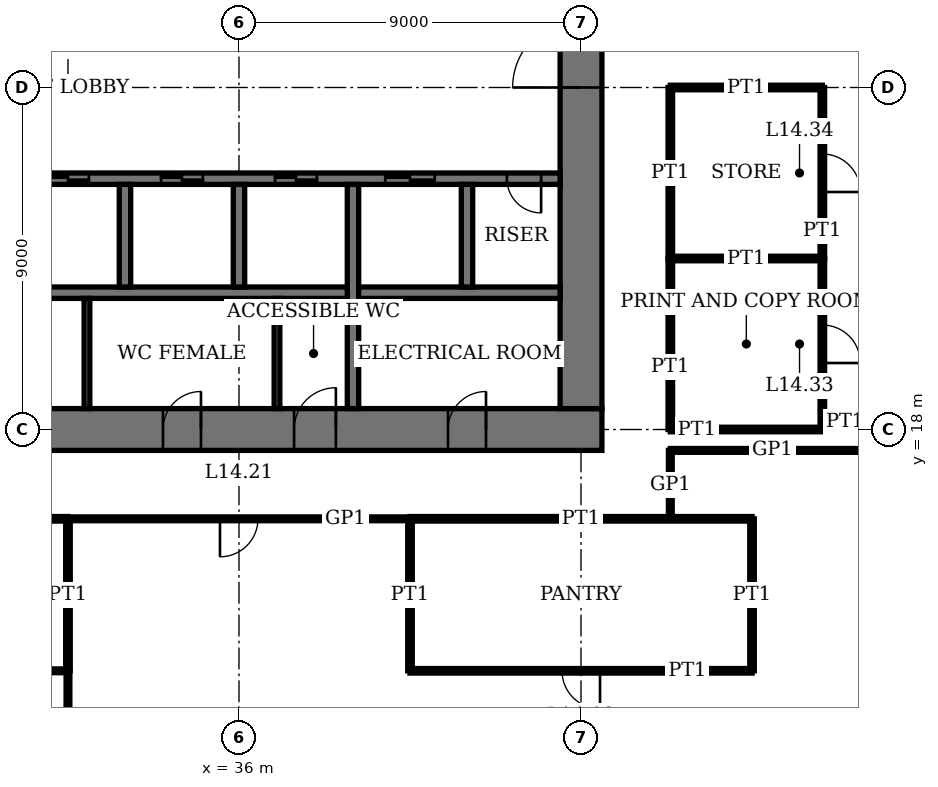
"""IFC4 building model, lengths in metres.
Left out: names, types, materials, properties, quantities, classifications, styles, units other than length and angle.
Written with IfcOpenShell. Run it as: python <this file> out.ifc"""

import sys

from ifc_helpers import new_model, si_unit, direction, frame, frame_2d, origin, place, context, subcontext, project, spatial, rectangle, extrude, element, fill, save


model = new_model("IFC4")
c1 = context("Model", 3, precision=1e-05, world=origin(), true_north=direction((0.0, 1.0)))
c2 = subcontext(c1, "Body", "Model", "MODEL_VIEW")
j1 = project(units=[si_unit("LENGTHUNIT", "METRE"), si_unit("PLANEANGLEUNIT", "RADIAN")], contexts=[c1])
p1 = place(None, origin())
s1 = spatial("IfcSite", under=j1, at=p1, CompositionType="ELEMENT")
p2 = place(p1, origin())
s2 = spatial("IfcBuilding", under=s1, at=p2, CompositionType="ELEMENT")
p3 = place(p2, frame((0.0, 0.0, 59.8)))
s3 = spatial("IfcBuildingStorey", under=s2, at=p3, CompositionType="ELEMENT", Elevation=59.8)
p4 = place(p3, frame((17.45, 18.0, 0.0), z_axis=(0.0, 0.0, 1.0), x_axis=(1.0, 0.0, 0.0)))
e1 = element("IfcWall", 1, at=p4, inside=s3, PredefinedType="SHEAR", context=c2, shape_type="SweptSolid", body=[
    extrude(rectangle(XDim=28.1, YDim=1.1, at=frame_2d((14.05, 0.0))), origin(), (0.0, 0.0, 1.0), 4.0),
])
p5 = place(p4, frame((11.55, 0.0, 0.0)))
e2 = element("IfcOpeningElement", 2, at=p5, cuts=e1, PredefinedType="OPENING", context=c2, shape_type="SweptSolid", body=[
    extrude(rectangle(XDim=1.0, YDim=2.4, at=frame_2d((0.5, 1.2))), frame((0.0, 0.56, 0.0), z_axis=(0.0, -1.0, 0.0), x_axis=(1.0, 0.0, 0.0)), (0.0, 0.0, 1.0), 1.12),
])
p6 = place(p4, frame((16.55, 0.0, 0.0)))
e3 = element("IfcOpeningElement", 3, at=p6, cuts=e1, PredefinedType="OPENING", context=c2, shape_type="SweptSolid", body=[
    extrude(rectangle(XDim=1.0, YDim=2.4, at=frame_2d((0.5, 1.2))), frame((0.0, 0.56, 0.0), z_axis=(0.0, -1.0, 0.0), x_axis=(1.0, 0.0, 0.0)), (0.0, 0.0, 1.0), 1.12),
])
p7 = place(p4, frame((20.0, 0.0, 0.0)))
e4 = element("IfcOpeningElement", 4, at=p7, cuts=e1, PredefinedType="OPENING", context=c2, shape_type="SweptSolid", body=[
    extrude(rectangle(XDim=1.1, YDim=2.4, at=frame_2d((0.55, 1.2))), frame((0.0, 0.56, 0.0), z_axis=(0.0, -1.0, 0.0), x_axis=(1.0, 0.0, 0.0)), (0.0, 0.0, 1.0), 1.12),
])
p8 = place(p4, frame((24.05, 0.0, 0.0)))
e5 = element("IfcOpeningElement", 5, at=p8, cuts=e1, PredefinedType="OPENING", context=c2, shape_type="SweptSolid", body=[
    extrude(rectangle(XDim=1.0, YDim=2.4, at=frame_2d((0.5, 1.2))), frame((0.0, 0.56, 0.0), z_axis=(0.0, -1.0, 0.0), x_axis=(1.0, 0.0, 0.0)), (0.0, 0.0, 1.0), 1.12),
])
p9 = place(p3, frame((45.0, 18.55, 0.0), z_axis=(0.0, 0.0, 1.0), x_axis=(0.0, 1.0, 0.0)))
e6 = element("IfcWall", 6, at=p9, inside=s3, PredefinedType="SHEAR", context=c2, shape_type="SweptSolid", body=[
    extrude(rectangle(XDim=16.9, YDim=1.1, at=frame_2d((8.45, 0.0))), origin(), (0.0, 0.0, 1.0), 4.0),
])
p10 = place(p9, frame((8.45, 0.0, 0.0)))
e7 = element("IfcOpeningElement", 7, at=p10, cuts=e6, PredefinedType="OPENING", context=c2, shape_type="SweptSolid", body=[
    extrude(rectangle(XDim=1.8, YDim=2.4, at=frame_2d((0.9, 1.2))), frame((0.0, 0.56, 0.0), z_axis=(0.0, -1.0, 0.0), x_axis=(1.0, 0.0, 0.0)), (0.0, 0.0, 1.0), 1.12),
])
p11 = place(p3, frame((18.55, 24.6, 0.0), z_axis=(0.0, 0.0, 1.0), x_axis=(1.0, 0.0, 0.0)))
e8 = element("IfcWall", 8, at=p11, inside=s3, PredefinedType="SHEAR", context=c2, shape_type="SweptSolid", body=[
    extrude(rectangle(XDim=25.9, YDim=0.3, at=frame_2d((12.95, 0.0))), origin(), (0.0, 0.0, 1.0), 4.0),
])
p12 = place(p11, frame((4.95, 0.0, 0.0)))
e9 = element("IfcOpeningElement", 9, at=p12, cuts=e8, PredefinedType="OPENING", context=c2, shape_type="SweptSolid", body=[
    extrude(rectangle(XDim=1.0, YDim=2.4, at=frame_2d((0.5, 1.2))), frame((0.0, 0.16, 0.0), z_axis=(0.0, -1.0, 0.0), x_axis=(1.0, 0.0, 0.0)), (0.0, 0.0, 1.0), 0.32),
])
p13 = place(p11, frame((24.5, 0.0, 0.0)))
e10 = element("IfcOpeningElement", 10, at=p13, cuts=e8, PredefinedType="OPENING", context=c2, shape_type="SweptSolid", body=[
    extrude(rectangle(XDim=0.9, YDim=2.1, at=frame_2d((0.45, 1.05))), frame((0.0, 0.16, 0.0), z_axis=(0.0, -1.0, 0.0), x_axis=(1.0, 0.0, 0.0)), (0.0, 0.0, 1.0), 0.32),
])
p14 = place(p11, frame((9.4, 0.0, 0.0)))
e11 = element("IfcOpeningElement", 11, at=p14, cuts=e8, PredefinedType="OPENING", context=c2, shape_type="SweptSolid", body=[
    extrude(rectangle(XDim=1.1, YDim=2.4, at=frame_2d((0.55, 1.2))), frame((0.0, 0.16, 0.0), z_axis=(0.0, -1.0, 0.0), x_axis=(1.0, 0.0, 0.0)), (0.0, 0.0, 1.0), 0.32),
])
p15 = place(p11, frame((12.4, 0.0, 0.0)))
e12 = element("IfcOpeningElement", 12, at=p15, cuts=e8, PredefinedType="OPENING", context=c2, shape_type="SweptSolid", body=[
    extrude(rectangle(XDim=1.1, YDim=2.4, at=frame_2d((0.55, 1.2))), frame((0.0, 0.16, 0.0), z_axis=(0.0, -1.0, 0.0), x_axis=(1.0, 0.0, 0.0)), (0.0, 0.0, 1.0), 0.32),
])
p16 = place(p11, frame((15.4, 0.0, 0.0)))
e13 = element("IfcOpeningElement", 13, at=p16, cuts=e8, PredefinedType="OPENING", context=c2, shape_type="SweptSolid", body=[
    extrude(rectangle(XDim=1.1, YDim=2.4, at=frame_2d((0.55, 1.2))), frame((0.0, 0.16, 0.0), z_axis=(0.0, -1.0, 0.0), x_axis=(1.0, 0.0, 0.0)), (0.0, 0.0, 1.0), 0.32),
])
p17 = place(p11, frame((18.4, 0.0, 0.0)))
e14 = element("IfcOpeningElement", 14, at=p17, cuts=e8, PredefinedType="OPENING", context=c2, shape_type="SweptSolid", body=[
    extrude(rectangle(XDim=1.1, YDim=2.4, at=frame_2d((0.55, 1.2))), frame((0.0, 0.16, 0.0), z_axis=(0.0, -1.0, 0.0), x_axis=(1.0, 0.0, 0.0)), (0.0, 0.0, 1.0), 0.32),
])
p18 = place(p11, frame((21.3, 0.0, 0.0)))
e15 = element("IfcOpeningElement", 15, at=p18, cuts=e8, PredefinedType="OPENING", context=c2, shape_type="SweptSolid", body=[
    extrude(rectangle(XDim=1.3, YDim=2.4, at=frame_2d((0.65, 1.2))), frame((0.0, 0.16, 0.0), z_axis=(0.0, -1.0, 0.0), x_axis=(1.0, 0.0, 0.0)), (0.0, 0.0, 1.0), 0.32),
])
p19 = place(p3, frame((27.15, 21.6, 0.0), z_axis=(0.0, 0.0, 1.0), x_axis=(1.0, 0.0, 0.0)))
e16 = element("IfcWall", 16, at=p19, inside=s3, PredefinedType="SHEAR", context=c2, shape_type="SweptSolid", body=[
    extrude(rectangle(XDim=17.3, YDim=0.3, at=frame_2d((8.65, 0.0))), origin(), (0.0, 0.0, 1.0), 4.0),
])
for number, where, z_axis, x_axis in (
    (17, (33.0, 21.75, 0.0), (0.0, 0.0, 1.0), (0.0, 1.0, 0.0)),
    (18, (36.0, 21.75, 0.0), (0.0, 0.0, 1.0), (0.0, 1.0, 0.0)),
):
    element("IfcWall", number, at=place(p3, frame(where, z_axis=z_axis, x_axis=x_axis)), inside=s3, PredefinedType="SHEAR", context=c2, shape_type="SweptSolid", body=[
        extrude(rectangle(XDim=2.7, YDim=0.3, at=frame_2d((1.35, 0.0))), origin(), (0.0, 0.0, 1.0), 4.0),
    ])
p20 = place(p3, frame((39.0, 18.55, 0.0), z_axis=(0.0, 0.0, 1.0), x_axis=(0.0, 1.0, 0.0)))
e19 = element("IfcWall", 19, at=p20, inside=s3, PredefinedType="SHEAR", context=c2, shape_type="SweptSolid", body=[
    extrude(rectangle(XDim=5.9, YDim=0.3, at=frame_2d((2.95, 0.0))), origin(), (0.0, 0.0, 1.0), 4.0),
])
p21 = place(p3, frame((42.0, 21.75, 0.0), z_axis=(0.0, 0.0, 1.0), x_axis=(0.0, 1.0, 0.0)))
e20 = element("IfcWall", 20, at=p21, inside=s3, PredefinedType="SHEAR", context=c2, shape_type="SweptSolid", body=[
    extrude(rectangle(XDim=2.7, YDim=0.3, at=frame_2d((1.35, 0.0))), origin(), (0.0, 0.0, 1.0), 4.0),
])
p22 = place(p3, frame((40.5, 11.65, 0.0), z_axis=(0.0, 0.0, 1.0), x_axis=(1.0, 0.0, 0.0)))
e21 = element("IfcWall", 21, at=p22, inside=s3, PredefinedType="PARTITIONING", context=c2, shape_type="SweptSolid", body=[
    extrude(rectangle(XDim=9.0, YDim=0.12, at=frame_2d((4.5, 0.0))), origin(), (0.0, 0.0, 1.0), 3.75),
])
p23 = place(p22, frame((4.0, 0.0, 0.0)))
e22 = element("IfcOpeningElement", 22, at=p23, cuts=e21, PredefinedType="OPENING", context=c2, shape_type="SweptSolid", body=[
    extrude(rectangle(XDim=1.0, YDim=2.4, at=frame_2d((0.5, 1.2))), frame((0.0, 0.07, 0.0), z_axis=(0.0, -1.0, 0.0), x_axis=(1.0, 0.0, 0.0)), (0.0, 0.0, 1.0), 0.14),
])
p24 = place(p3, frame((22.5, 11.65, 0.0), z_axis=(0.0, 0.0, 1.0), x_axis=(1.0, 0.0, 0.0)))
e23 = element("IfcWall", 23, at=p24, inside=s3, PredefinedType="PARTITIONING", context=c2, shape_type="SweptSolid", body=[
    extrude(rectangle(XDim=9.0, YDim=0.1, at=frame_2d((4.5, 0.0))), origin(), (0.0, 0.0, 1.0), 3.75),
])
p25 = place(p24, frame((4.0, 0.0, 0.0)))
e24 = element("IfcOpeningElement", 24, at=p25, cuts=e23, PredefinedType="OPENING", context=c2, shape_type="SweptSolid", body=[
    extrude(rectangle(XDim=1.0, YDim=2.4, at=frame_2d((0.5, 1.2))), frame((0.0, 0.06, 0.0), z_axis=(0.0, -1.0, 0.0), x_axis=(1.0, 0.0, 0.0)), (0.0, 0.0, 1.0), 0.12),
])
for number, where, z_axis, x_axis in (
    (25, (22.5, 15.65, 0.0), (0.0, 0.0, 1.0), (1.0, 0.0, 0.0)),
    (26, (40.5, 15.65, 0.0), (0.0, 0.0, 1.0), (1.0, 0.0, 0.0)),
):
    element("IfcWall", number, at=place(p3, frame(where, z_axis=z_axis, x_axis=x_axis)), inside=s3, PredefinedType="PARTITIONING", context=c2, shape_type="SweptSolid", body=[
        extrude(rectangle(XDim=9.0, YDim=0.12, at=frame_2d((4.5, 0.0))), origin(), (0.0, 0.0, 1.0), 3.75),
    ])
p26 = place(p3, frame((31.5, 15.65, 0.0), z_axis=(0.0, 0.0, 1.0), x_axis=(1.0, 0.0, 0.0)))
e27 = element("IfcWall", 27, at=p26, inside=s3, PredefinedType="PARTITIONING", context=c2, shape_type="SweptSolid", body=[
    extrude(rectangle(XDim=9.0, YDim=0.1, at=frame_2d((4.5, 0.0))), origin(), (0.0, 0.0, 1.0), 3.75),
])
p27 = place(p26, frame((4.0, 0.0, 0.0)))
e28 = element("IfcOpeningElement", 28, at=p27, cuts=e27, PredefinedType="OPENING", context=c2, shape_type="SweptSolid", body=[
    extrude(rectangle(XDim=1.0, YDim=2.4, at=frame_2d((0.5, 1.2))), frame((0.0, 0.06, 0.0), z_axis=(0.0, -1.0, 0.0), x_axis=(1.0, 0.0, 0.0)), (0.0, 0.0, 1.0), 0.12),
])
p28 = place(p3, frame((47.35, 17.45, 0.0), z_axis=(0.0, 0.0, 1.0), x_axis=(1.0, 0.0, 0.0)))
e29 = element("IfcWall", 29, at=p28, inside=s3, PredefinedType="PARTITIONING", context=c2, shape_type="SweptSolid", body=[
    extrude(rectangle(XDim=5.575, YDim=0.1, at=frame_2d((2.788, 0.0))), origin(), (0.0, 0.0, 1.0), 3.75),
])
p29 = place(p3, frame((47.35, 18.0, 0.0), z_axis=(0.0, 0.0, 1.0), x_axis=(1.0, 0.0, 0.0)))
e30 = element("IfcWall", 30, at=p29, inside=s3, PredefinedType="PARTITIONING", context=c2, shape_type="SweptSolid", body=[
    extrude(rectangle(XDim=4.0, YDim=0.12, at=frame_2d((2.0, 0.0))), origin(), (0.0, 0.0, 1.0), 3.05),
])
p30 = place(p3, frame((47.35, 22.5, 0.0), z_axis=(0.0, 0.0, 1.0), x_axis=(1.0, 0.0, 0.0)))
e31 = element("IfcWall", 31, at=p30, inside=s3, PredefinedType="PARTITIONING", context=c2, shape_type="SweptSolid", body=[
    extrude(rectangle(XDim=4.0, YDim=0.12, at=frame_2d((2.0, 0.0))), origin(), (0.0, 0.0, 1.0), 3.1),
])
p31 = place(p3, frame((47.35, 27.0, 0.0), z_axis=(0.0, 0.0, 1.0), x_axis=(1.0, 0.0, 0.0)))
e32 = element("IfcWall", 32, at=p31, inside=s3, PredefinedType="PARTITIONING", context=c2, shape_type="SweptSolid", body=[
    extrude(rectangle(XDim=4.0, YDim=0.12, at=frame_2d((2.0, 0.0))), origin(), (0.0, 0.0, 1.0), 3.05),
])
p32 = place(p3, frame((31.5, 11.65, 0.0), z_axis=(0.0, 0.0, 1.0), x_axis=(0.0, 1.0, 0.0)))
e33 = element("IfcWall", 33, at=p32, inside=s3, PredefinedType="PARTITIONING", context=c2, shape_type="SweptSolid", body=[
    extrude(rectangle(XDim=4.0, YDim=0.12, at=frame_2d((2.0, 0.0))), origin(), (0.0, 0.0, 1.0), 3.75),
])
p33 = place(p3, frame((31.5, 0.31, 0.0), z_axis=(0.0, 0.0, 1.0), x_axis=(0.0, 1.0, 0.0)))
e34 = element("IfcWall", 34, at=p33, inside=s3, PredefinedType="PARTITIONING", context=c2, shape_type="SweptSolid", body=[
    extrude(rectangle(XDim=11.34, YDim=0.1, at=frame_2d((5.67, 0.0))), origin(), (0.0, 0.0, 1.0), 3.75),
])
p34 = place(p3, frame((40.5, 11.65, 0.0), z_axis=(0.0, 0.0, 1.0), x_axis=(0.0, 1.0, 0.0)))
e35 = element("IfcWall", 35, at=p34, inside=s3, PredefinedType="PARTITIONING", context=c2, shape_type="SweptSolid", body=[
    extrude(rectangle(XDim=4.0, YDim=0.12, at=frame_2d((2.0, 0.0))), origin(), (0.0, 0.0, 1.0), 3.75),
])
for number, where, z_axis, x_axis in (
    (36, (47.35, 18.0, 0.0), (0.0, 0.0, 1.0), (0.0, 1.0, 0.0)),
    (37, (47.35, 22.5, 0.0), (0.0, 0.0, 1.0), (0.0, 1.0, 0.0)),
):
    element("IfcWall", number, at=place(p3, frame(where, z_axis=z_axis, x_axis=x_axis)), inside=s3, PredefinedType="PARTITIONING", context=c2, shape_type="SweptSolid", body=[
        extrude(rectangle(XDim=4.5, YDim=0.12, at=frame_2d((2.25, 0.0))), origin(), (0.0, 0.0, 1.0), 3.75),
    ])
p35 = place(p3, frame((47.35, 15.65, 0.0), z_axis=(0.0, 0.0, 1.0), x_axis=(0.0, 1.0, 0.0)))
e38 = element("IfcWall", 38, at=p35, inside=s3, PredefinedType="PARTITIONING", context=c2, shape_type="SweptSolid", body=[
    extrude(rectangle(XDim=1.8, YDim=0.1, at=frame_2d((0.9, 0.0))), origin(), (0.0, 0.0, 1.0), 3.75),
])
p36 = place(p3, frame((49.5, 11.65, 0.0), z_axis=(0.0, 0.0, 1.0), x_axis=(0.0, 1.0, 0.0)))
e39 = element("IfcWall", 39, at=p36, inside=s3, PredefinedType="PARTITIONING", context=c2, shape_type="SweptSolid", body=[
    extrude(rectangle(XDim=4.0, YDim=0.12, at=frame_2d((2.0, 0.0))), origin(), (0.0, 0.0, 1.0), 3.75),
])
p37 = place(p3, frame((51.35, 18.0, 0.0), z_axis=(0.0, 0.0, 1.0), x_axis=(0.0, 1.0, 0.0)))
e40 = element("IfcWall", 40, at=p37, inside=s3, PredefinedType="PARTITIONING", context=c2, shape_type="SweptSolid", body=[
    extrude(rectangle(XDim=4.5, YDim=0.12, at=frame_2d((2.25, 0.0))), origin(), (0.0, 0.0, 1.0), 3.75),
])
p38 = place(p37, frame((1.75, 0.0, 0.0)))
e41 = element("IfcOpeningElement", 41, at=p38, cuts=e40, PredefinedType="OPENING", context=c2, shape_type="SweptSolid", body=[
    extrude(rectangle(XDim=1.0, YDim=2.4, at=frame_2d((0.5, 1.2))), frame((0.0, 0.07, 0.0), z_axis=(0.0, -1.0, 0.0), x_axis=(1.0, 0.0, 0.0)), (0.0, 0.0, 1.0), 0.14),
])
p39 = place(p3, frame((51.35, 22.5, 0.0), z_axis=(0.0, 0.0, 1.0), x_axis=(0.0, 1.0, 0.0)))
e42 = element("IfcWall", 42, at=p39, inside=s3, PredefinedType="PARTITIONING", context=c2, shape_type="SweptSolid", body=[
    extrude(rectangle(XDim=4.5, YDim=0.12, at=frame_2d((2.25, 0.0))), origin(), (0.0, 0.0, 1.0), 3.75),
])
p40 = place(p39, frame((1.75, 0.0, 0.0)))
e43 = element("IfcOpeningElement", 43, at=p40, cuts=e42, PredefinedType="OPENING", context=c2, shape_type="SweptSolid", body=[
    extrude(rectangle(XDim=1.0, YDim=2.4, at=frame_2d((0.5, 1.2))), frame((0.0, 0.07, 0.0), z_axis=(0.0, -1.0, 0.0), x_axis=(1.0, 0.0, 0.0)), (0.0, 0.0, 1.0), 0.14),
])
for number, where, z_axis, x_axis in (
    (44, (32.0, 18.55, 0.0), (0.0, 0.0, 1.0), (0.0, 1.0, 0.0)),
    (45, (37.0, 18.55, 0.0), (0.0, 0.0, 1.0), (0.0, 1.0, 0.0)),
):
    element("IfcWall", number, at=place(p3, frame(where, z_axis=z_axis, x_axis=x_axis)), inside=s3, PredefinedType="PARTITIONING", context=c2, shape_type="SweptSolid", body=[
        extrude(rectangle(XDim=2.9, YDim=0.15, at=frame_2d((1.45, 0.0))), origin(), (0.0, 0.0, 1.0), 3.75),
    ])
p41 = place(p10, origin())
e46 = element("IfcDoor", 46, at=p41, inside=s3, OperationType="DOUBLE_DOOR_DOUBLE_SWING", PredefinedType="DOOR", context=c2, shape_type="SweptSolid", body=[
    extrude(rectangle(XDim=1.8, YDim=2.4, at=frame_2d((0.9, 1.2))), frame((0.0, 0.03, 0.0), z_axis=(0.0, -1.0, 0.0), x_axis=(1.0, 0.0, 0.0)), (0.0, 0.0, 1.0), 0.06),
    extrude(rectangle(XDim=0.04, YDim=2.4, at=frame_2d((0.02, 1.2))), frame((0.0, 0.55, 0.0), z_axis=(0.0, -1.0, 0.0), x_axis=(1.0, 0.0, 0.0)), (0.0, 0.0, 1.0), 1.1),
    extrude(rectangle(XDim=0.04, YDim=2.4, at=frame_2d((1.78, 1.2))), frame((0.0, 0.55, 0.0), z_axis=(0.0, -1.0, 0.0), x_axis=(1.0, 0.0, 0.0)), (0.0, 0.0, 1.0), 1.1),
    extrude(rectangle(XDim=1.8, YDim=0.04, at=frame_2d((0.9, 2.38))), frame((0.0, 0.55, 0.0), z_axis=(0.0, -1.0, 0.0), x_axis=(1.0, 0.0, 0.0)), (0.0, 0.0, 1.0), 1.1),
])
fill(e7, e46)
p42 = place(p6, origin())
e47 = element("IfcDoor", 47, at=p42, inside=s3, OperationType="SINGLE_SWING_LEFT", PredefinedType="DOOR", context=c2, shape_type="SweptSolid", body=[
    extrude(rectangle(XDim=1.0, YDim=2.4, at=frame_2d((0.5, 1.2))), frame((0.0, 0.025, 0.0), z_axis=(0.0, -1.0, 0.0), x_axis=(1.0, 0.0, 0.0)), (0.0, 0.0, 1.0), 0.05),
    extrude(rectangle(XDim=0.04, YDim=2.4, at=frame_2d((0.02, 1.2))), frame((0.0, 0.4, 0.0), z_axis=(0.0, -1.0, 0.0), x_axis=(1.0, 0.0, 0.0)), (0.0, 0.0, 1.0), 0.8),
    extrude(rectangle(XDim=0.04, YDim=2.4, at=frame_2d((0.98, 1.2))), frame((0.0, 0.4, 0.0), z_axis=(0.0, -1.0, 0.0), x_axis=(1.0, 0.0, 0.0)), (0.0, 0.0, 1.0), 0.8),
    extrude(rectangle(XDim=1.0, YDim=0.04, at=frame_2d((0.5, 2.38))), frame((0.0, 0.4, 0.0), z_axis=(0.0, -1.0, 0.0), x_axis=(1.0, 0.0, 0.0)), (0.0, 0.0, 1.0), 0.8),
])
fill(e3, e47)
p43 = place(p7, origin())
e48 = element("IfcDoor", 48, at=p43, inside=s3, OperationType="SINGLE_SWING_LEFT", PredefinedType="DOOR", context=c2, shape_type="SweptSolid", body=[
    extrude(rectangle(XDim=1.1, YDim=2.4, at=frame_2d((0.55, 1.2))), frame((0.0, 0.025, 0.0), z_axis=(0.0, -1.0, 0.0), x_axis=(1.0, 0.0, 0.0)), (0.0, 0.0, 1.0), 0.05),
    extrude(rectangle(XDim=0.04, YDim=2.4, at=frame_2d((0.02, 1.2))), frame((0.0, 0.44, 0.0), z_axis=(0.0, -1.0, 0.0), x_axis=(1.0, 0.0, 0.0)), (0.0, 0.0, 1.0), 0.88),
    extrude(rectangle(XDim=0.04, YDim=2.4, at=frame_2d((1.08, 1.2))), frame((0.0, 0.44, 0.0), z_axis=(0.0, -1.0, 0.0), x_axis=(1.0, 0.0, 0.0)), (0.0, 0.0, 1.0), 0.88),
    extrude(rectangle(XDim=1.1, YDim=0.04, at=frame_2d((0.55, 2.38))), frame((0.0, 0.44, 0.0), z_axis=(0.0, -1.0, 0.0), x_axis=(1.0, 0.0, 0.0)), (0.0, 0.0, 1.0), 0.88),
])
fill(e4, e48)
p44 = place(p8, origin())
e49 = element("IfcDoor", 49, at=p44, inside=s3, OperationType="SINGLE_SWING_LEFT", PredefinedType="DOOR", context=c2, shape_type="SweptSolid", body=[
    extrude(rectangle(XDim=1.0, YDim=2.4, at=frame_2d((0.5, 1.2))), frame((0.0, 0.025, 0.0), z_axis=(0.0, -1.0, 0.0), x_axis=(1.0, 0.0, 0.0)), (0.0, 0.0, 1.0), 0.05),
    extrude(rectangle(XDim=0.04, YDim=2.4, at=frame_2d((0.02, 1.2))), frame((0.0, 0.4, 0.0), z_axis=(0.0, -1.0, 0.0), x_axis=(1.0, 0.0, 0.0)), (0.0, 0.0, 1.0), 0.8),
    extrude(rectangle(XDim=0.04, YDim=2.4, at=frame_2d((0.98, 1.2))), frame((0.0, 0.4, 0.0), z_axis=(0.0, -1.0, 0.0), x_axis=(1.0, 0.0, 0.0)), (0.0, 0.0, 1.0), 0.8),
    extrude(rectangle(XDim=1.0, YDim=0.04, at=frame_2d((0.5, 2.38))), frame((0.0, 0.4, 0.0), z_axis=(0.0, -1.0, 0.0), x_axis=(1.0, 0.0, 0.0)), (0.0, 0.0, 1.0), 0.8),
])
fill(e5, e49)
p45 = place(p13, origin())
e50 = element("IfcDoor", 50, at=p45, inside=s3, OperationType="SINGLE_SWING_RIGHT", PredefinedType="DOOR", context=c2, shape_type="SweptSolid", body=[
    extrude(rectangle(XDim=0.9, YDim=2.1, at=frame_2d((0.45, 1.05))), frame((0.0, 0.03, 0.0), z_axis=(0.0, -1.0, 0.0), x_axis=(1.0, 0.0, 0.0)), (0.0, 0.0, 1.0), 0.06),
])
fill(e10, e50)
p46 = place(p23, origin())
e51 = element("IfcDoor", 51, at=p46, inside=s3, OperationType="SINGLE_SWING_RIGHT", PredefinedType="DOOR", context=c2, shape_type="SweptSolid", body=[
    extrude(rectangle(XDim=1.0, YDim=2.4, at=frame_2d((0.5, 1.2))), frame((0.0, 0.025, 0.0), z_axis=(0.0, -1.0, 0.0), x_axis=(1.0, 0.0, 0.0)), (0.0, 0.0, 1.0), 0.05),
])
fill(e22, e51)
p47 = place(p27, origin())
e52 = element("IfcDoor", 52, at=p47, inside=s3, OperationType="SINGLE_SWING_LEFT", PredefinedType="DOOR", context=c2, shape_type="SweptSolid", body=[
    extrude(rectangle(XDim=1.0, YDim=2.4, at=frame_2d((0.5, 1.2))), frame((0.0, 0.02, 0.0), z_axis=(0.0, -1.0, 0.0), x_axis=(1.0, 0.0, 0.0)), (0.0, 0.0, 1.0), 0.04),
])
fill(e28, e52)
p48 = place(p38, origin())
e53 = element("IfcDoor", 53, at=p48, inside=s3, OperationType="SINGLE_SWING_LEFT", PredefinedType="DOOR", context=c2, shape_type="SweptSolid", body=[
    extrude(rectangle(XDim=1.0, YDim=2.4, at=frame_2d((0.5, 1.2))), frame((0.0, 0.025, 0.0), z_axis=(0.0, -1.0, 0.0), x_axis=(1.0, 0.0, 0.0)), (0.0, 0.0, 1.0), 0.05),
])
fill(e41, e53)
p49 = place(p40, origin())
e54 = element("IfcDoor", 54, at=p49, inside=s3, OperationType="SINGLE_SWING_LEFT", PredefinedType="DOOR", context=c2, shape_type="SweptSolid", body=[
    extrude(rectangle(XDim=1.0, YDim=2.4, at=frame_2d((0.5, 1.2))), frame((0.0, 0.025, 0.0), z_axis=(0.0, -1.0, 0.0), x_axis=(1.0, 0.0, 0.0)), (0.0, 0.0, 1.0), 0.05),
])
fill(e43, e54)
p50 = place(p15, origin())
e55 = element("IfcDoor", 55, at=p50, inside=s3, OperationType="DOUBLE_DOOR_SLIDING", PredefinedType="DOOR", context=c2, shape_type="SweptSolid", body=[
    extrude(rectangle(XDim=1.1, YDim=2.4, at=frame_2d((0.55, 1.2))), frame((0.0, 0.02, 0.0), z_axis=(0.0, -1.0, 0.0), x_axis=(1.0, 0.0, 0.0)), (0.0, 0.0, 1.0), 0.04),
])
fill(e12, e55)
p51 = place(p16, origin())
e56 = element("IfcDoor", 56, at=p51, inside=s3, OperationType="DOUBLE_DOOR_SLIDING", PredefinedType="DOOR", context=c2, shape_type="SweptSolid", body=[
    extrude(rectangle(XDim=1.1, YDim=2.4, at=frame_2d((0.55, 1.2))), frame((0.0, 0.02, 0.0), z_axis=(0.0, -1.0, 0.0), x_axis=(1.0, 0.0, 0.0)), (0.0, 0.0, 1.0), 0.04),
])
fill(e13, e56)
p52 = place(p17, origin())
e57 = element("IfcDoor", 57, at=p52, inside=s3, OperationType="DOUBLE_DOOR_SLIDING", PredefinedType="DOOR", context=c2, shape_type="SweptSolid", body=[
    extrude(rectangle(XDim=1.1, YDim=2.4, at=frame_2d((0.55, 1.2))), frame((0.0, 0.02, 0.0), z_axis=(0.0, -1.0, 0.0), x_axis=(1.0, 0.0, 0.0)), (0.0, 0.0, 1.0), 0.04),
])
fill(e14, e57)
p53 = place(p18, origin())
e58 = element("IfcDoor", 58, at=p53, inside=s3, OperationType="DOUBLE_DOOR_SLIDING", PredefinedType="DOOR", context=c2, shape_type="SweptSolid", body=[
    extrude(rectangle(XDim=1.3, YDim=2.4, at=frame_2d((0.65, 1.2))), frame((0.0, 0.02, 0.0), z_axis=(0.0, -1.0, 0.0), x_axis=(1.0, 0.0, 0.0)), (0.0, 0.0, 1.0), 0.04),
])
fill(e15, e58)
save(model, sys.argv[1])
